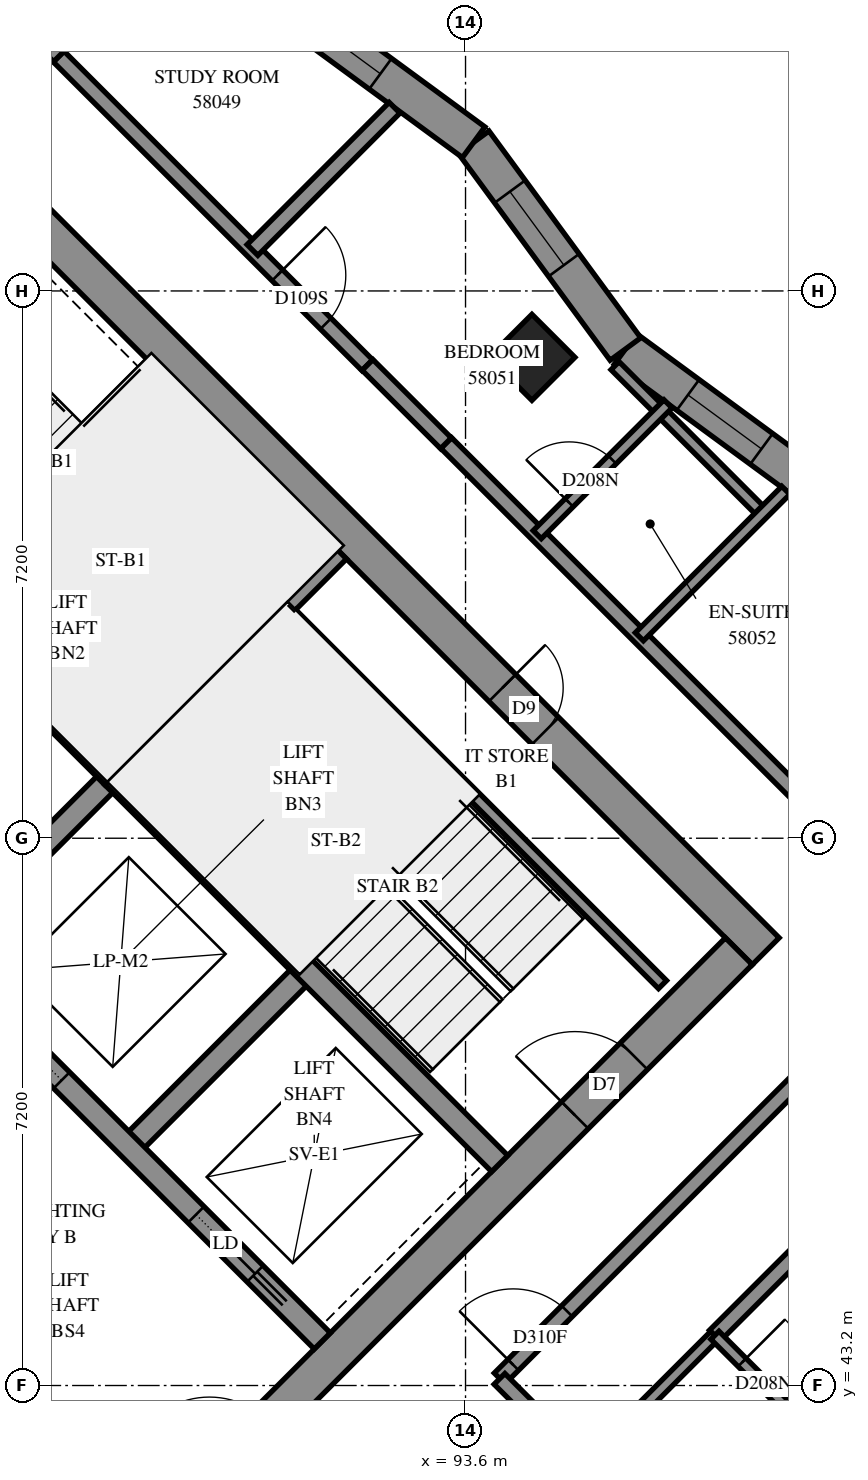
"""IFC4 building model, lengths in metres.
Left out: names, types, materials, properties, quantities, classifications, styles, units other than length and angle.
Written with IfcOpenShell. Run it as: python <this file> out.ifc"""

import sys

from ifc_helpers import new_model, si_unit, direction, frame, frame_2d, origin, origin_2d, place, context, subcontext, project, spatial, polyline, rectangle, outline, extrude, element, fill, save


model = new_model("IFC4")
c1 = context("Model", 3, precision=1e-05, world=origin(), true_north=direction((0.0, 1.0)))
c2 = subcontext(c1, "Body", "Model", "MODEL_VIEW")
j1 = project(units=[si_unit("LENGTHUNIT", "METRE"), si_unit("PLANEANGLEUNIT", "RADIAN")], contexts=[c1])
p1 = place(None, origin())
s1 = spatial("IfcSite", under=j1, at=p1, CompositionType="ELEMENT")
p2 = place(p1, origin())
s2 = spatial("IfcBuilding", under=s1, at=p2, CompositionType="ELEMENT")
p3 = place(p2, frame((0.0, 0.0, 213.4)))
s3 = spatial("IfcBuildingStorey", under=s2, at=p3, CompositionType="ELEMENT", Elevation=213.4)
p4 = place(p3, frame((94.474, 56.727, 0.0), z_axis=(0.0, 0.0, 1.0), x_axis=(0.7071067812, -0.7071067812, 0.0)))
e1 = element("IfcColumn", 1, at=p4, inside=s3, PredefinedType="COLUMN", context=c2, shape_type="SweptSolid", body=[
    extrude(rectangle(XDim=0.8, YDim=0.8, at=origin_2d()), origin(), (0.0, 0.0, 1.0), 3.1),
])
p5 = place(p3, frame((86.66, 59.802, -0.3), z_axis=(0.0, 0.0, 1.0), x_axis=(0.7071067812, -0.7071067812, 0.0)))
e2 = element("IfcWall", 2, at=p5, inside=s3, PredefinedType="SHEAR", context=c2, shape_type="SweptSolid", body=[
    extrude(rectangle(XDim=15.4, YDim=0.5, at=frame_2d((7.7, 0.0))), origin(), (0.0, 0.0, 1.0), 2.7),
])
p6 = place(p5, frame((10.5, 0.0, 0.3)))
e3 = element("IfcOpeningElement", 3, at=p6, cuts=e2, PredefinedType="OPENING", context=c2, shape_type="SweptSolid", body=[
    extrude(rectangle(XDim=0.8, YDim=2.1, at=frame_2d((0.4, 1.05))), frame((0.0, 0.26, 0.0), z_axis=(0.0, -1.0, 0.0), x_axis=(1.0, 0.0, 0.0)), (0.0, 0.0, 1.0), 0.52),
])
p7 = place(p3, frame((87.013, 38.731, -0.3), z_axis=(0.0, 0.0, 1.0), x_axis=(0.7071067812, 0.7071067812, 0.0)))
e4 = element("IfcWall", 4, at=p7, inside=s3, PredefinedType="SHEAR", context=c2, shape_type="SweptSolid", body=[
    extrude(rectangle(XDim=14.4, YDim=0.5, at=frame_2d((7.2, 0.0))), origin(), (0.0, 0.0, 1.0), 2.7),
])
p8 = place(p7, frame((4.55, 0.0, 0.3)))
e5 = element("IfcOpeningElement", 5, at=p8, cuts=e4, PredefinedType="OPENING", context=c2, shape_type="SweptSolid", body=[
    extrude(rectangle(XDim=1.1, YDim=2.1, at=frame_2d((0.55, 1.05))), frame((0.0, 0.26, 0.0), z_axis=(0.0, -1.0, 0.0), x_axis=(1.0, 0.0, 0.0)), (0.0, 0.0, 1.0), 0.52),
])
p9 = place(p7, frame((11.35, 0.0, 0.3)))
e6 = element("IfcOpeningElement", 6, at=p9, cuts=e4, PredefinedType="OPENING", context=c2, shape_type="SweptSolid", body=[
    extrude(rectangle(XDim=1.1, YDim=2.1, at=frame_2d((0.55, 1.05))), frame((0.0, 0.26, 0.0), z_axis=(0.0, -1.0, 0.0), x_axis=(1.0, 0.0, 0.0)), (0.0, 0.0, 1.0), 0.52),
])
for number, where, z_axis, x_axis in (
    (7, (86.625, 48.878, 0.0), (0.0, 0.0, 1.0), (0.707, 0.707, 0.0)),
    (8, (89.17, 46.332, 0.0), (0.0, 0.0, 1.0), (0.707, 0.707, 0.0)),
):
    element("IfcWall", number, at=place(p3, frame(where, z_axis=z_axis, x_axis=x_axis)), inside=s3, PredefinedType="SOLIDWALL", context=c2, shape_type="SweptSolid", body=[
        extrude(rectangle(XDim=3.3, YDim=0.3, at=frame_2d((1.65, 0.0))), origin(), (0.0, 0.0, 1.0), 3.1),
    ])
p10 = place(p3, frame((78.988, 51.423, 0.0), z_axis=(0.0, 0.0, 1.0), x_axis=(0.7071067812, -0.7071067812, 0.0)))
e9 = element("IfcWall", 9, at=p10, inside=s3, PredefinedType="SOLIDWALL", context=c2, shape_type="SweptSolid", body=[
    extrude(rectangle(XDim=14.4, YDim=0.3, at=frame_2d((7.2, 0.0))), origin(), (0.0, 0.0, 1.0), 3.1),
])
p11 = place(p10, frame((1.35, 0.0, 0.0)))
e10 = element("IfcOpeningElement", 10, at=p11, cuts=e9, PredefinedType="OPENING", context=c2, shape_type="SweptSolid", body=[
    extrude(rectangle(XDim=0.9, YDim=2.1, at=frame_2d((0.45, 1.05))), frame((0.0, 0.16, 0.0), z_axis=(0.0, -1.0, 0.0), x_axis=(1.0, 0.0, 0.0)), (0.0, 0.0, 1.0), 0.32),
])
p12 = place(p10, frame((4.95, 0.0, 0.0)))
e11 = element("IfcOpeningElement", 11, at=p12, cuts=e9, PredefinedType="OPENING", context=c2, shape_type="SweptSolid", body=[
    extrude(rectangle(XDim=0.9, YDim=2.1, at=frame_2d((0.45, 1.05))), frame((0.0, 0.16, 0.0), z_axis=(0.0, -1.0, 0.0), x_axis=(1.0, 0.0, 0.0)), (0.0, 0.0, 1.0), 0.32),
])
p13 = place(p10, frame((8.55, 0.0, 0.0)))
e12 = element("IfcOpeningElement", 12, at=p13, cuts=e9, PredefinedType="OPENING", context=c2, shape_type="SweptSolid", body=[
    extrude(rectangle(XDim=0.9, YDim=2.1, at=frame_2d((0.45, 1.05))), frame((0.0, 0.16, 0.0), z_axis=(0.0, -1.0, 0.0), x_axis=(1.0, 0.0, 0.0)), (0.0, 0.0, 1.0), 0.32),
])
p14 = place(p10, frame((12.05, 0.0, 0.0)))
e13 = element("IfcOpeningElement", 13, at=p14, cuts=e9, PredefinedType="OPENING", context=c2, shape_type="SweptSolid", body=[
    extrude(rectangle(XDim=1.1, YDim=2.1, at=frame_2d((0.55, 1.05))), frame((0.0, 0.16, 0.0), z_axis=(0.0, -1.0, 0.0), x_axis=(1.0, 0.0, 0.0)), (0.0, 0.0, 1.0), 0.32),
])
p15 = place(p3, frame((81.534, 53.969, 0.0), z_axis=(0.0, 0.0, 1.0), x_axis=(0.707103309, -0.7071102534, 0.0)))
e14 = element("IfcWall", 14, at=p15, inside=s3, PredefinedType="SOLIDWALL", context=c2, shape_type="SweptSolid", body=[
    extrude(rectangle(XDim=14.4, YDim=0.3, at=frame_2d((7.2, 0.0))), origin(), (0.0, 0.0, 1.0), 3.1),
])
p16 = place(p15, frame((1.25, 0.0, 0.0)))
e15 = element("IfcOpeningElement", 15, at=p16, cuts=e14, PredefinedType="OPENING", context=c2, shape_type="SweptSolid", body=[
    extrude(rectangle(XDim=1.1, YDim=2.1, at=frame_2d((0.55, 1.05))), frame((0.0, 0.16, 0.0), z_axis=(0.0, -1.0, 0.0), x_axis=(1.0, 0.0, 0.0)), (0.0, 0.0, 1.0), 0.32),
])
p17 = place(p15, frame((4.85, 0.0, 0.0)))
e16 = element("IfcOpeningElement", 16, at=p17, cuts=e14, PredefinedType="OPENING", context=c2, shape_type="SweptSolid", body=[
    extrude(rectangle(XDim=1.1, YDim=2.1, at=frame_2d((0.55, 1.05))), frame((0.0, 0.16, 0.0), z_axis=(0.0, -1.0, 0.0), x_axis=(1.0, 0.0, 0.0)), (0.0, 0.0, 1.0), 0.32),
])
p18 = place(p15, frame((8.45, 0.0, 0.0)))
e17 = element("IfcOpeningElement", 17, at=p18, cuts=e14, PredefinedType="OPENING", context=c2, shape_type="SweptSolid", body=[
    extrude(rectangle(XDim=1.1, YDim=2.1, at=frame_2d((0.55, 1.05))), frame((0.0, 0.16, 0.0), z_axis=(0.0, -1.0, 0.0), x_axis=(1.0, 0.0, 0.0)), (0.0, 0.0, 1.0), 0.32),
])
p19 = place(p15, frame((12.05, 0.0, 0.0)))
e18 = element("IfcOpeningElement", 18, at=p19, cuts=e14, PredefinedType="OPENING", context=c2, shape_type="SweptSolid", body=[
    extrude(rectangle(XDim=1.1, YDim=2.1, at=frame_2d((0.55, 1.05))), frame((0.0, 0.16, 0.0), z_axis=(0.0, -1.0, 0.0), x_axis=(1.0, 0.0, 0.0)), (0.0, 0.0, 1.0), 0.32),
])
for number, where, z_axis, x_axis in (
    (19, (83.867, 56.302, 0.0), (0.0, 0.0, 1.0), (0.707, -0.707, 0.0)),
    (20, (88.958, 51.211, 0.0), (0.0, 0.0, 1.0), (0.707, -0.707, 0.0)),
):
    element("IfcWall", number, at=place(p3, frame(where, z_axis=z_axis, x_axis=x_axis)), inside=s3, PredefinedType="SOLIDWALL", context=c2, shape_type="SweptSolid", body=[
        extrude(rectangle(XDim=7.2, YDim=0.3, at=frame_2d((3.6, 0.0))), origin(), (0.0, 0.0, 1.0), 3.1),
    ])
p20 = place(p3, frame((88.958, 51.211, 0.0), z_axis=(0.0, 0.0, 1.0), x_axis=(0.7071067812, 0.7071067812, 0.0)))
e21 = element("IfcWall", 21, at=p20, inside=s3, PredefinedType="SOLIDWALL", context=c2, shape_type="SweptSolid", body=[
    extrude(rectangle(XDim=4.2, YDim=0.3, at=frame_2d((2.1, 0.0))), origin(), (0.0, 0.0, 1.0), 3.1),
])
p21 = place(p3, frame((98.424, 54.839, 0.0), z_axis=(0.0, 0.0, 1.0), x_axis=(-0.806200528, 0.5916423825, 0.0)))
e22 = element("IfcWall", 22, at=p21, inside=s3, PredefinedType="SOLIDWALL", context=c2, shape_type="SweptSolid", body=[
    extrude(outline(polyline([(-0.038, -0.25), (3.337, -0.25), (3.413, 0.25), (0.038, 0.25), (-0.038, -0.25)])), origin(), (0.0, 0.0, 1.0), 3.1),
])
p22 = place(p21, frame((1.155, 0.0, 0.45)))
e23 = element("IfcOpeningElement", 23, at=p22, cuts=e22, PredefinedType="OPENING", context=c2, shape_type="SweptSolid", body=[
    extrude(rectangle(XDim=1.2, YDim=2.5, at=frame_2d((0.6, 1.25))), frame((0.0, 0.26, 0.0), z_axis=(0.0, -1.0, 0.0), x_axis=(1.0, 0.0, 0.0)), (0.0, 0.0, 1.0), 0.52),
])
p23 = place(p3, frame((95.704, 56.836, 0.0), z_axis=(0.0, 0.0, 1.0), x_axis=(-0.5916423825, 0.806200528, 0.0)))
e24 = element("IfcWall", 24, at=p23, inside=s3, PredefinedType="SOLIDWALL", context=c2, shape_type="SweptSolid", body=[
    extrude(outline(polyline([(0.038, -0.25), (3.413, -0.25), (3.337, 0.25), (-0.038, 0.25), (0.038, -0.25)])), origin(), (0.0, 0.0, 1.0), 3.1),
])
p24 = place(p23, frame((1.369, 0.0, 0.45)))
e25 = element("IfcOpeningElement", 25, at=p24, cuts=e24, PredefinedType="OPENING", context=c2, shape_type="SweptSolid", body=[
    extrude(rectangle(XDim=1.2, YDim=2.5, at=frame_2d((0.6, 1.25))), frame((0.0, 0.26, 0.0), z_axis=(0.0, -1.0, 0.0), x_axis=(1.0, 0.0, 0.0)), (0.0, 0.0, 1.0), 0.52),
])
p25 = place(p3, frame((93.707, 59.556, 0.0), z_axis=(0.0, 0.0, 1.0), x_axis=(-0.8061901555, 0.5916565162, 0.0)))
e26 = element("IfcWall", 26, at=p25, inside=s3, PredefinedType="SOLIDWALL", context=c2, shape_type="SweptSolid", body=[
    extrude(outline(polyline([(-0.038, -0.25), (3.337, -0.25), (3.413, 0.25), (0.038, 0.25), (-0.038, -0.25)])), origin(), (0.0, 0.0, 1.0), 3.1),
])
p26 = place(p25, frame((1.522, 0.0, 0.45)))
e27 = element("IfcOpeningElement", 27, at=p26, cuts=e26, PredefinedType="OPENING", context=c2, shape_type="SweptSolid", body=[
    extrude(rectangle(XDim=1.2, YDim=2.5, at=frame_2d((0.6, 1.25))), frame((0.0, 0.26, 0.0), z_axis=(0.0, -1.0, 0.0), x_axis=(1.0, 0.0, 0.0)), (0.0, 0.0, 1.0), 0.52),
])
p27 = place(p3, frame((91.313, 53.354, 0.0), z_axis=(0.0, 0.0, 1.0), x_axis=(0.7071140275, -0.7070995348, 0.0)))
e28 = element("IfcWall", 28, at=p27, inside=s3, PredefinedType="PARTITIONING", context=c2, shape_type="SweptSolid", body=[
    extrude(rectangle(XDim=6.9, YDim=0.15, at=frame_2d((3.45, 0.0))), origin(), (0.0, 0.0, 1.0), 3.1),
])
p28 = place(p3, frame((93.346, 55.599, 0.0), z_axis=(0.0, 0.0, 1.0), x_axis=(0.7071067812, -0.7071067812, 0.0)))
e29 = element("IfcWall", 29, at=p28, inside=s3, PredefinedType="PARTITIONING", context=c2, shape_type="SweptSolid", body=[
    extrude(rectangle(XDim=9.201, YDim=0.2, at=frame_2d((4.601, 0.0))), origin(), (0.0, 0.0, 1.0), 3.1),
])
p29 = place(p3, frame((94.049, 43.293, 0.0), z_axis=(0.0, 0.0, 1.0), x_axis=(0.7071067812, 0.7071067812, 0.0)))
e30 = element("IfcWall", 30, at=p29, inside=s3, PredefinedType="PARTITIONING", context=c2, shape_type="SweptSolid", body=[
    extrude(rectangle(XDim=8.2, YDim=0.2, at=frame_2d((4.1, 0.0))), origin(), (0.0, 0.0, 1.0), 3.1),
])
p30 = place(p29, frame((0.252, 0.0, 0.0)))
e31 = element("IfcOpeningElement", 31, at=p30, cuts=e30, PredefinedType="OPENING", context=c2, shape_type="SweptSolid", body=[
    extrude(rectangle(XDim=1.0, YDim=2.1, at=frame_2d((0.5, 1.05))), frame((0.0, 0.11, 0.0), z_axis=(0.0, -1.0, 0.0), x_axis=(1.0, 0.0, 0.0)), (0.0, 0.0, 1.0), 0.22),
])
p31 = place(p3, frame((88.247, 60.683, 0.0), z_axis=(0.0, 0.0, 1.0), x_axis=(0.7071067812, -0.7071067812, 0.0)))
e32 = element("IfcWall", 32, at=p31, inside=s3, PredefinedType="PARTITIONING", context=c2, shape_type="SweptSolid", body=[
    extrude(rectangle(XDim=5.742, YDim=0.2, at=frame_2d((2.871, 0.0))), origin(), (0.0, 0.0, 1.0), 3.1),
])
p32 = place(p31, frame((4.069, 0.0, 0.0)))
e33 = element("IfcOpeningElement", 33, at=p32, cuts=e32, PredefinedType="OPENING", context=c2, shape_type="SweptSolid", body=[
    extrude(rectangle(XDim=0.9, YDim=2.1, at=frame_2d((0.45, 1.05))), frame((0.0, 0.11, 0.0), z_axis=(0.0, -1.0, 0.0), x_axis=(1.0, 0.0, 0.0)), (0.0, 0.0, 1.0), 0.22),
])
p33 = place(p3, frame((94.047, 43.287, 0.0), z_axis=(0.0, 0.0, 1.0), x_axis=(0.7071067812, -0.7071067812, 0.0)))
e34 = element("IfcWall", 34, at=p33, inside=s3, PredefinedType="PARTITIONING", context=c2, shape_type="SweptSolid", body=[
    extrude(rectangle(XDim=5.199, YDim=0.2, at=frame_2d((2.599, 0.0))), origin(), (0.0, 0.0, 1.0), 3.1),
])
p34 = place(p33, frame((3.898, 0.0, 0.0)))
e35 = element("IfcOpeningElement", 35, at=p34, cuts=e34, PredefinedType="OPENING", context=c2, shape_type="SweptSolid", body=[
    extrude(rectangle(XDim=0.9, YDim=2.1, at=frame_2d((0.45, 1.05))), frame((0.0, 0.11, 0.0), z_axis=(0.0, -1.0, 0.0), x_axis=(1.0, 0.0, 0.0)), (0.0, 0.0, 1.0), 0.22),
])
p35 = place(p3, frame((96.88, 43.856, 0.0), z_axis=(0.0, 0.0, 1.0), x_axis=(0.7074098182, 0.7068036142, 0.0)))
e36 = element("IfcWall", 36, at=p35, inside=s3, PredefinedType="PARTITIONING", context=c2, shape_type="SweptSolid", body=[
    extrude(rectangle(XDim=3.299, YDim=0.2, at=frame_2d((1.65, 0.0))), origin(), (0.0, 0.0, 1.0), 3.1),
])
p36 = place(p3, frame((95.567, 56.617, 0.0), z_axis=(0.0, 0.0, 1.0), x_axis=(0.7071249702, -0.7070885917, 0.0)))
e37 = element("IfcWall", 37, at=p36, inside=s3, PredefinedType="PARTITIONING", context=c2, shape_type="SweptSolid", body=[
    extrude(rectangle(XDim=2.749, YDim=0.15, at=frame_2d((1.374, 0.0))), origin(), (0.0, 0.0, 1.0), 3.1),
])
p37 = place(p3, frame((95.887, 53.051, 0.0), z_axis=(0.0, 0.0, 1.0), x_axis=(0.7071067812, 0.7071067812, 0.0)))
e38 = element("IfcWall", 38, at=p37, inside=s3, PredefinedType="PARTITIONING", context=c2, shape_type="SweptSolid", body=[
    extrude(rectangle(XDim=2.724, YDim=0.15, at=frame_2d((1.362, 0.0))), origin(), (0.0, 0.0, 1.0), 3.1),
])
p38 = place(p3, frame((90.797, 58.139, 0.0), z_axis=(0.0, 0.0, 1.0), x_axis=(0.7066529259, 0.7075603454, 0.0)))
e39 = element("IfcWall", 39, at=p38, inside=s3, PredefinedType="PARTITIONING", context=c2, shape_type="SweptSolid", body=[
    extrude(rectangle(XDim=2.645, YDim=0.2, at=frame_2d((1.322, 0.0))), origin(), (0.0, 0.0, 1.0), 3.1),
])
p39 = place(p3, frame((95.179, 42.161, 0.0), z_axis=(0.0, 0.0, 1.0), x_axis=(0.7071067812, 0.7071067812, 0.0)))
e40 = element("IfcWall", 40, at=p39, inside=s3, PredefinedType="PARTITIONING", context=c2, shape_type="SweptSolid", body=[
    extrude(rectangle(XDim=2.401, YDim=0.15, at=frame_2d((1.201, 0.0))), origin(), (0.0, 0.0, 1.0), 3.1),
])
p40 = place(p3, frame((94.544, 54.394, 0.0), z_axis=(0.0, 0.0, 1.0), x_axis=(0.7071067812, 0.7071067812, 0.0)))
e41 = element("IfcWall", 41, at=p40, inside=s3, PredefinedType="PARTITIONING", context=c2, shape_type="SweptSolid", body=[
    extrude(rectangle(XDim=2.433, YDim=0.15, at=frame_2d((1.216, 0.0))), origin(), (0.0, 0.0, 1.0), 3.1),
])
p41 = place(p40, frame((0.594, 0.0, 0.0)))
e42 = element("IfcOpeningElement", 42, at=p41, cuts=e41, PredefinedType="OPENING", context=c2, shape_type="SweptSolid", body=[
    extrude(rectangle(XDim=0.8, YDim=2.1, at=frame_2d((0.4, 1.05))), frame((0.0, 0.085, 0.0), z_axis=(0.0, -1.0, 0.0), x_axis=(1.0, 0.0, 0.0)), (0.0, 0.0, 1.0), 0.17),
])
p42 = place(p3, frame((96.881, 43.861, 0.0), z_axis=(0.0, 0.0, 1.0), x_axis=(0.7071067812, -0.7071067812, 0.0)))
e43 = element("IfcWall", 43, at=p42, inside=s3, PredefinedType="PARTITIONING", context=c2, shape_type="SweptSolid", body=[
    extrude(rectangle(XDim=1.901, YDim=0.15, at=frame_2d((0.95, 0.0))), origin(), (0.0, 0.0, 1.0), 3.1),
])
p43 = place(p42, frame((0.505, 0.0, 0.0)))
e44 = element("IfcOpeningElement", 44, at=p43, cuts=e43, PredefinedType="OPENING", context=c2, shape_type="SweptSolid", body=[
    extrude(rectangle(XDim=0.8, YDim=2.1, at=frame_2d((0.4, 1.05))), frame((0.0, 0.085, 0.0), z_axis=(0.0, -1.0, 0.0), x_axis=(1.0, 0.0, 0.0)), (0.0, 0.0, 1.0), 0.17),
])
p44 = place(p3, frame((92.311, 56.627, 0.0), z_axis=(0.0, 0.0, 1.0), x_axis=(0.7077922938, -0.7064206033, 0.0)))
e45 = element("IfcWall", 45, at=p44, inside=s3, PredefinedType="PARTITIONING", context=c2, shape_type="SweptSolid", body=[
    extrude(rectangle(XDim=1.458, YDim=0.2, at=frame_2d((0.729, 0.0))), origin(), (0.0, 0.0, 1.0), 3.1),
])
p45 = place(p3, frame((87.899, 61.041, 0.0), z_axis=(0.0, 0.0, 1.0), x_axis=(0.7051008166, -0.7091070712, 0.0)))
e46 = element("IfcWall", 46, at=p45, inside=s3, PredefinedType="PARTITIONING", context=c2, shape_type="SweptSolid", body=[
    extrude(rectangle(XDim=0.499, YDim=0.2, at=frame_2d((0.25, 0.0))), origin(), (0.0, 0.0, 1.0), 3.1),
])
p46 = place(p22, origin())
e47 = element("IfcWindow", 47, at=p46, inside=s3, PartitioningType="SINGLE_PANEL", PredefinedType="WINDOW", context=c2, shape_type="SweptSolid", body=[
    extrude(rectangle(XDim=1.2, YDim=2.5, at=frame_2d((0.6, 1.25))), frame((0.0, 0.18, 0.0), z_axis=(0.0, -1.0, 0.0), x_axis=(1.0, 0.0, 0.0)), (0.0, 0.0, 1.0), 0.06),
])
fill(e23, e47)
p47 = place(p24, origin())
e48 = element("IfcWindow", 48, at=p47, inside=s3, PartitioningType="SINGLE_PANEL", PredefinedType="WINDOW", context=c2, shape_type="SweptSolid", body=[
    extrude(rectangle(XDim=1.2, YDim=2.5, at=frame_2d((0.6, 1.25))), frame((0.0, 0.18, 0.0), z_axis=(0.0, -1.0, 0.0), x_axis=(1.0, 0.0, 0.0)), (0.0, 0.0, 1.0), 0.06),
])
fill(e25, e48)
p48 = place(p26, origin())
e49 = element("IfcWindow", 49, at=p48, inside=s3, PartitioningType="SINGLE_PANEL", PredefinedType="WINDOW", context=c2, shape_type="SweptSolid", body=[
    extrude(rectangle(XDim=1.2, YDim=2.5, at=frame_2d((0.6, 1.25))), frame((0.0, 0.18, 0.0), z_axis=(0.0, -1.0, 0.0), x_axis=(1.0, 0.0, 0.0)), (0.0, 0.0, 1.0), 0.06),
])
fill(e27, e49)
p49 = place(p6, origin())
e50 = element("IfcDoor", 50, at=p49, inside=s3, OperationType="SINGLE_SWING_RIGHT", PredefinedType="DOOR", context=c2, shape_type="SweptSolid", body=[
    extrude(rectangle(XDim=0.8, YDim=2.1, at=frame_2d((0.4, 1.05))), frame((0.0, 0.025, 0.0), z_axis=(0.0, -1.0, 0.0), x_axis=(1.0, 0.0, 0.0)), (0.0, 0.0, 1.0), 0.05),
])
fill(e3, e50)
p50 = place(p9, origin())
e51 = element("IfcDoor", 51, at=p50, inside=s3, OperationType="SINGLE_SWING_RIGHT", PredefinedType="DOOR", context=c2, shape_type="SweptSolid", body=[
    extrude(rectangle(XDim=1.1, YDim=2.1, at=frame_2d((0.55, 1.05))), frame((0.0, 0.025, 0.0), z_axis=(0.0, -1.0, 0.0), x_axis=(1.0, 0.0, 0.0)), (0.0, 0.0, 1.0), 0.05),
])
fill(e6, e51)
p51 = place(p18, origin())
e52 = element("IfcDoor", 52, at=p51, inside=s3, OperationType="SLIDING_TO_LEFT", PredefinedType="DOOR", context=c2, shape_type="SweptSolid", body=[
    extrude(rectangle(XDim=1.1, YDim=2.1, at=frame_2d((0.55, 1.05))), frame((0.0, 0.025, 0.0), z_axis=(0.0, -1.0, 0.0), x_axis=(1.0, 0.0, 0.0)), (0.0, 0.0, 1.0), 0.05),
])
fill(e17, e52)
p52 = place(p19, origin())
e53 = element("IfcDoor", 53, at=p52, inside=s3, OperationType="SLIDING_TO_RIGHT", PredefinedType="DOOR", context=c2, shape_type="SweptSolid", body=[
    extrude(rectangle(XDim=1.1, YDim=2.1, at=frame_2d((0.55, 1.05))), frame((0.0, 0.025, 0.0), z_axis=(0.0, -1.0, 0.0), x_axis=(1.0, 0.0, 0.0)), (0.0, 0.0, 1.0), 0.05),
])
fill(e18, e53)
p53 = place(p30, origin())
e54 = element("IfcDoor", 54, at=p53, inside=s3, OperationType="SINGLE_SWING_RIGHT", PredefinedType="DOOR", context=c2, shape_type="SweptSolid", body=[
    extrude(rectangle(XDim=1.0, YDim=2.1, at=frame_2d((0.5, 1.05))), frame((0.0, 0.025, 0.0), z_axis=(0.0, -1.0, 0.0), x_axis=(1.0, 0.0, 0.0)), (0.0, 0.0, 1.0), 0.05),
])
fill(e31, e54)
p54 = place(p32, origin())
e55 = element("IfcDoor", 55, at=p54, inside=s3, OperationType="SINGLE_SWING_RIGHT", PredefinedType="DOOR", context=c2, shape_type="SweptSolid", body=[
    extrude(rectangle(XDim=0.9, YDim=2.1, at=frame_2d((0.45, 1.05))), frame((0.0, 0.025, 0.0), z_axis=(0.0, -1.0, 0.0), x_axis=(1.0, 0.0, 0.0)), (0.0, 0.0, 1.0), 0.05),
])
fill(e33, e55)
p55 = place(p41, origin())
e56 = element("IfcDoor", 56, at=p55, inside=s3, OperationType="SINGLE_SWING_RIGHT", PredefinedType="DOOR", context=c2, shape_type="SweptSolid", body=[
    extrude(rectangle(XDim=0.8, YDim=2.1, at=frame_2d((0.4, 1.05))), frame((0.0, 0.025, 0.0), z_axis=(0.0, -1.0, 0.0), x_axis=(1.0, 0.0, 0.0)), (0.0, 0.0, 1.0), 0.05),
])
fill(e42, e56)
p56 = place(p43, origin())
e57 = element("IfcDoor", 57, at=p56, inside=s3, OperationType="SINGLE_SWING_RIGHT", PredefinedType="DOOR", context=c2, shape_type="SweptSolid", body=[
    extrude(rectangle(XDim=0.8, YDim=2.1, at=frame_2d((0.4, 1.05))), frame((0.0, 0.025, 0.0), z_axis=(0.0, -1.0, 0.0), x_axis=(1.0, 0.0, 0.0)), (0.0, 0.0, 1.0), 0.05),
])
fill(e44, e57)
save(model, sys.argv[1])
